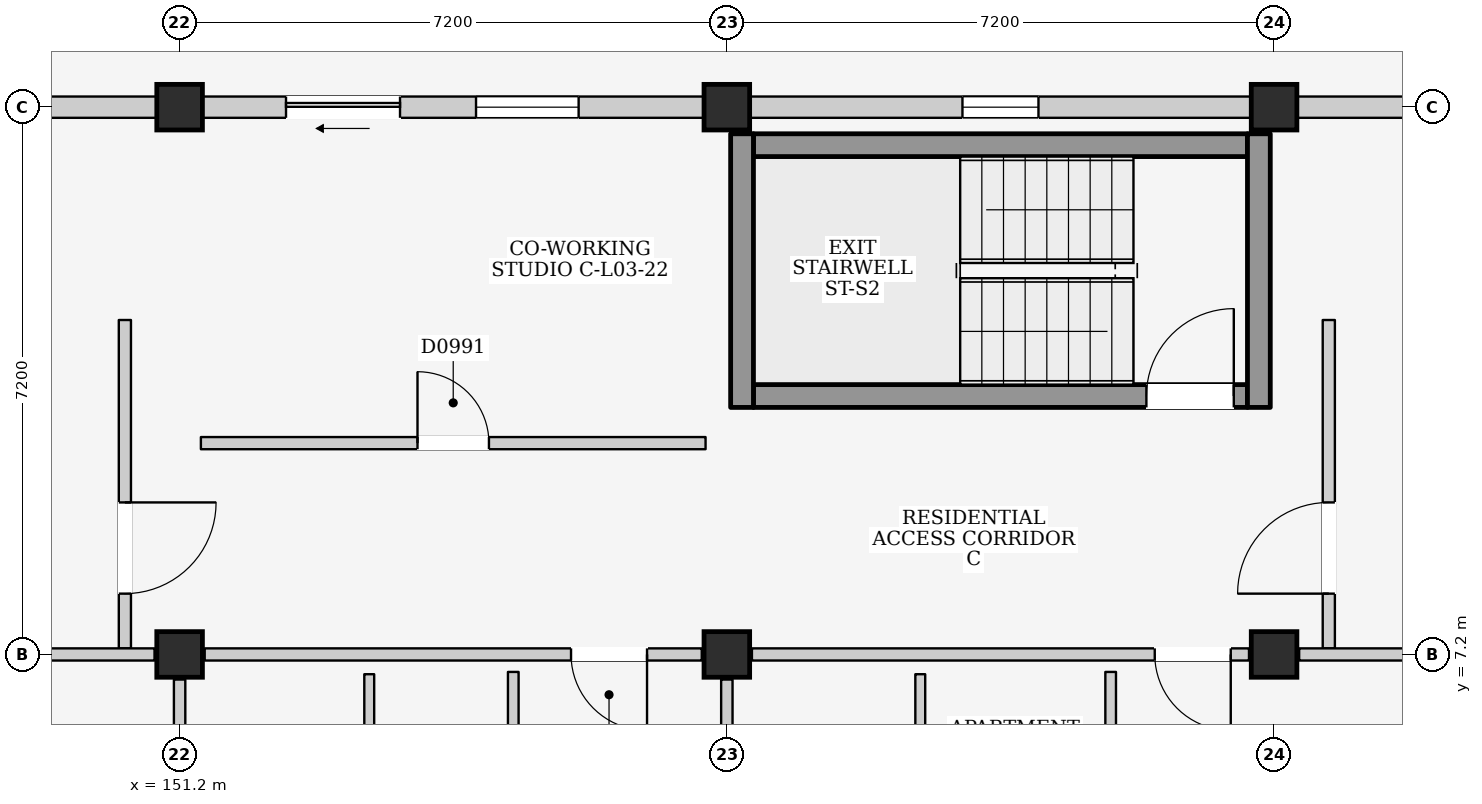
"""IFC4 building model, lengths in metres.
Left out: names, types, materials, properties, quantities, classifications, styles, units other than length and angle.
Written with IfcOpenShell. Run it as: python <this file> out.ifc"""

import sys

from ifc_helpers import new_model, si_unit, direction, frame, frame_2d, origin, origin_2d, place, context, subcontext, project, spatial, rectangle, extrude, element, fill, save


model = new_model("IFC4")
c1 = context("Model", 3, precision=1e-05, world=origin(), true_north=direction((0.0, 1.0)))
c2 = subcontext(c1, "Body", "Model", "MODEL_VIEW")
j1 = project(units=[si_unit("LENGTHUNIT", "METRE"), si_unit("PLANEANGLEUNIT", "RADIAN")], contexts=[c1])
p1 = place(None, origin())
s1 = spatial("IfcSite", under=j1, at=p1, CompositionType="ELEMENT")
p2 = place(p1, origin())
s2 = spatial("IfcBuilding", under=s1, at=p2, CompositionType="ELEMENT")
p3 = place(p2, frame((0.0, 0.0, 12.2)))
s3 = spatial("IfcBuildingStorey", under=s2, at=p3, CompositionType="ELEMENT", Elevation=12.2)
for number, where, z_axis, x_axis in (
    (1, (151.2, 7.2, 0.0), (0.0, 0.0, 1.0), (1.0, 0.0, 0.0)),
    (2, (151.2, 14.4, 0.0), (0.0, 0.0, 1.0), (1.0, 0.0, 0.0)),
    (3, (158.4, 7.2, 0.0), (0.0, 0.0, 1.0), (1.0, 0.0, 0.0)),
    (4, (158.4, 14.4, 0.0), (0.0, 0.0, 1.0), (1.0, 0.0, 0.0)),
    (5, (165.6, 7.2, 0.0), (0.0, 0.0, 1.0), (1.0, 0.0, 0.0)),
    (6, (165.6, 14.4, 0.0), (0.0, 0.0, 1.0), (1.0, 0.0, 0.0)),
):
    element("IfcColumn", number, at=place(p3, frame(where, z_axis=z_axis, x_axis=x_axis)), inside=s3, PredefinedType="COLUMN", context=c2, shape_type="SweptSolid", body=[
        extrude(rectangle(XDim=0.6, YDim=0.6, at=origin_2d()), origin(), (0.0, 0.0, 1.0), 3.2),
    ])
p4 = place(p3, frame((144.3, 14.4, 0.0), z_axis=(0.0, 0.0, 1.0), x_axis=(1.0, 0.0, 0.0)))
e7 = element("IfcWall", 7, at=p4, inside=s3, PredefinedType="ELEMENTEDWALL", context=c2, shape_type="SweptSolid", body=[
    extrude(rectangle(XDim=6.6, YDim=0.28, at=frame_2d((3.3, 0.0))), origin(), (0.0, 0.0, 1.0), 2.365),
])
p5 = place(p4, frame((2.8, 0.0, 1.2)))
e8 = element("IfcOpeningElement", 8, at=p5, cuts=e7, PredefinedType="OPENING", context=c2, shape_type="SweptSolid", body=[
    extrude(rectangle(XDim=1.0, YDim=0.9, at=frame_2d((0.5, 0.45))), frame((0.0, 0.155, 0.0), z_axis=(0.0, -1.0, 0.0), x_axis=(1.0, 0.0, 0.0)), (0.0, 0.0, 1.0), 0.31),
])
p6 = place(p3, frame((151.5, 14.4, 0.0), z_axis=(0.0, 0.0, 1.0), x_axis=(1.0, 0.0, 0.0)))
e9 = element("IfcWall", 9, at=p6, inside=s3, PredefinedType="ELEMENTEDWALL", context=c2, shape_type="SweptSolid", body=[
    extrude(rectangle(XDim=6.6, YDim=0.28, at=frame_2d((3.3, 0.0))), origin(), (0.0, 0.0, 1.0), 2.365),
])
p7 = place(p6, frame((1.1, 0.0, 0.0)))
e10 = element("IfcOpeningElement", 10, at=p7, cuts=e9, PredefinedType="OPENING", context=c2, shape_type="SweptSolid", body=[
    extrude(rectangle(XDim=1.5, YDim=2.12, at=frame_2d((0.75, 1.06))), frame((0.0, 0.155, 0.0), z_axis=(0.0, -1.0, 0.0), x_axis=(1.0, 0.0, 0.0)), (0.0, 0.0, 1.0), 0.31),
])
p8 = place(p6, frame((3.6, 0.0, 0.755)))
e11 = element("IfcOpeningElement", 11, at=p8, cuts=e9, PredefinedType="OPENING", context=c2, shape_type="SweptSolid", body=[
    extrude(rectangle(XDim=1.35, YDim=1.5, at=frame_2d((0.675, 0.75))), frame((0.0, 0.155, 0.0), z_axis=(0.0, -1.0, 0.0), x_axis=(1.0, 0.0, 0.0)), (0.0, 0.0, 1.0), 0.31),
])
p9 = place(p3, frame((158.7, 14.4, 0.0), z_axis=(0.0, 0.0, 1.0), x_axis=(1.0, 0.0, 0.0)))
e12 = element("IfcWall", 12, at=p9, inside=s3, PredefinedType="ELEMENTEDWALL", context=c2, shape_type="SweptSolid", body=[
    extrude(rectangle(XDim=6.6, YDim=0.28, at=frame_2d((3.3, 0.0))), origin(), (0.0, 0.0, 1.0), 2.365),
])
p10 = place(p9, frame((2.8, 0.0, 1.2)))
e13 = element("IfcOpeningElement", 13, at=p10, cuts=e12, PredefinedType="OPENING", context=c2, shape_type="SweptSolid", body=[
    extrude(rectangle(XDim=1.0, YDim=0.9, at=frame_2d((0.5, 0.45))), frame((0.0, 0.155, 0.0), z_axis=(0.0, -1.0, 0.0), x_axis=(1.0, 0.0, 0.0)), (0.0, 0.0, 1.0), 0.31),
])
p11 = place(p3, frame((165.9, 14.4, 0.0), z_axis=(0.0, 0.0, 1.0), x_axis=(1.0, 0.0, 0.0)))
e14 = element("IfcWall", 14, at=p11, inside=s3, PredefinedType="ELEMENTEDWALL", context=c2, shape_type="SweptSolid", body=[
    extrude(rectangle(XDim=6.6, YDim=0.28, at=frame_2d((3.3, 0.0))), origin(), (0.0, 0.0, 1.0), 2.365),
])
p12 = place(p11, frame((2.8, 0.0, 1.2)))
e15 = element("IfcOpeningElement", 15, at=p12, cuts=e14, PredefinedType="OPENING", context=c2, shape_type="SweptSolid", body=[
    extrude(rectangle(XDim=1.0, YDim=0.9, at=frame_2d((0.5, 0.45))), frame((0.0, 0.155, 0.0), z_axis=(0.0, -1.0, 0.0), x_axis=(1.0, 0.0, 0.0)), (0.0, 0.0, 1.0), 0.31),
])
p13 = place(p3, frame((150.48, 7.28, 0.0), z_axis=(0.0, 0.0, 1.0), x_axis=(0.0, 1.0, 0.0)))
e16 = element("IfcWall", 16, at=p13, inside=s3, PredefinedType="PARTITIONING", context=c2, shape_type="SweptSolid", body=[
    extrude(rectangle(XDim=4.32, YDim=0.16, at=frame_2d((2.16, 0.0))), origin(), (0.0, 0.0, 1.0), 2.98),
])
p14 = place(p13, frame((0.72, 0.0, 0.0)))
e17 = element("IfcOpeningElement", 17, at=p14, cuts=e16, PredefinedType="OPENING", context=c2, shape_type="SweptSolid", body=[
    extrude(rectangle(XDim=1.2, YDim=2.2, at=frame_2d((0.6, 1.1))), frame((0.0, 0.095, 0.0), z_axis=(0.0, -1.0, 0.0), x_axis=(1.0, 0.0, 0.0)), (0.0, 0.0, 1.0), 0.19),
])
p15 = place(p3, frame((158.75, 10.6, 0.0), z_axis=(0.0, 0.0, 1.0), x_axis=(1.0, 0.0, 0.0)))
e18 = element("IfcWall", 18, at=p15, inside=s3, PredefinedType="SHEAR", context=c2, shape_type="SweptSolid", body=[
    extrude(rectangle(XDim=6.5, YDim=0.3, at=frame_2d((3.25, 0.0))), origin(), (0.0, 0.0, 1.0), 2.98),
])
p16 = place(p15, frame((5.17, 0.0, 0.0)))
e19 = element("IfcOpeningElement", 19, at=p16, cuts=e18, PredefinedType="OPENING", context=c2, shape_type="SweptSolid", body=[
    extrude(rectangle(XDim=1.15, YDim=2.2, at=frame_2d((0.575, 1.1))), frame((0.0, 0.165, 0.0), z_axis=(0.0, -1.0, 0.0), x_axis=(1.0, 0.0, 0.0)), (0.0, 0.0, 1.0), 0.33),
])
p17 = place(p3, frame((158.75, 13.9, 0.0), z_axis=(0.0, 0.0, 1.0), x_axis=(1.0, 0.0, 0.0)))
e20 = element("IfcWall", 20, at=p17, inside=s3, PredefinedType="SHEAR", context=c2, shape_type="SweptSolid", body=[
    extrude(rectangle(XDim=6.5, YDim=0.3, at=frame_2d((3.25, 0.0))), origin(), (0.0, 0.0, 1.0), 2.98),
])
for number, where, z_axis, x_axis in (
    (21, (158.6, 10.45, 0.0), (0.0, 0.0, 1.0), (0.0, 1.0, 0.0)),
    (22, (165.4, 10.45, 0.0), (0.0, 0.0, 1.0), (0.0, 1.0, 0.0)),
):
    element("IfcWall", number, at=place(p3, frame(where, z_axis=z_axis, x_axis=x_axis)), inside=s3, PredefinedType="SHEAR", context=c2, shape_type="SweptSolid", body=[
        extrude(rectangle(XDim=3.6, YDim=0.3, at=frame_2d((1.8, 0.0))), origin(), (0.0, 0.0, 1.0), 2.98),
    ])
p18 = place(p3, frame((166.32, 7.28, 0.0), z_axis=(0.0, 0.0, 1.0), x_axis=(0.0, 1.0, 0.0)))
e23 = element("IfcWall", 23, at=p18, inside=s3, PredefinedType="PARTITIONING", context=c2, shape_type="SweptSolid", body=[
    extrude(rectangle(XDim=4.32, YDim=0.16, at=frame_2d((2.16, 0.0))), origin(), (0.0, 0.0, 1.0), 2.98),
])
p19 = place(p18, frame((0.72, 0.0, 0.0)))
e24 = element("IfcOpeningElement", 24, at=p19, cuts=e23, PredefinedType="OPENING", context=c2, shape_type="SweptSolid", body=[
    extrude(rectangle(XDim=1.2, YDim=2.2, at=frame_2d((0.6, 1.1))), frame((0.0, 0.095, 0.0), z_axis=(0.0, -1.0, 0.0), x_axis=(1.0, 0.0, 0.0)), (0.0, 0.0, 1.0), 0.19),
])
p20 = place(p3, frame((144.33, 7.2, 0.0), z_axis=(0.0, 0.0, 1.0), x_axis=(1.0, 0.0, 0.0)))
e25 = element("IfcWall", 25, at=p20, inside=s3, PredefinedType="PARTITIONING", context=c2, shape_type="SweptSolid", body=[
    extrude(rectangle(XDim=6.54, YDim=0.16, at=frame_2d((3.27, 0.0))), origin(), (0.0, 0.0, 1.0), 2.365),
])
p21 = place(p3, frame((151.2, 0.33, 0.0), z_axis=(0.0, 0.0, 1.0), x_axis=(0.0, 1.0, 0.0)))
e26 = element("IfcWall", 26, at=p21, inside=s3, PredefinedType="PARTITIONING", context=c2, shape_type="SweptSolid", body=[
    extrude(rectangle(XDim=6.54, YDim=0.15, at=frame_2d((3.27, 0.0))), origin(), (0.0, 0.0, 1.0), 2.415),
])
p22 = place(p3, frame((151.53, 7.2, 0.0), z_axis=(0.0, 0.0, 1.0), x_axis=(1.0, 0.0, 0.0)))
e27 = element("IfcWall", 27, at=p22, inside=s3, PredefinedType="PARTITIONING", context=c2, shape_type="SweptSolid", body=[
    extrude(rectangle(XDim=6.54, YDim=0.16, at=frame_2d((3.27, 0.0))), origin(), (0.0, 0.0, 1.0), 2.365),
])
p23 = place(p22, frame((4.82, 0.0, 0.0)))
e28 = element("IfcOpeningElement", 28, at=p23, cuts=e27, PredefinedType="OPENING", context=c2, shape_type="SweptSolid", body=[
    extrude(rectangle(XDim=1.0, YDim=2.15, at=frame_2d((0.5, 1.075))), frame((0.0, 0.095, 0.0), z_axis=(0.0, -1.0, 0.0), x_axis=(1.0, 0.0, 0.0)), (0.0, 0.0, 1.0), 0.19),
])
p24 = place(p3, frame((158.4, 0.33, 0.0), z_axis=(0.0, 0.0, 1.0), x_axis=(0.0, 1.0, 0.0)))
e29 = element("IfcWall", 29, at=p24, inside=s3, PredefinedType="PARTITIONING", context=c2, shape_type="SweptSolid", body=[
    extrude(rectangle(XDim=6.54, YDim=0.15, at=frame_2d((3.27, 0.0))), origin(), (0.0, 0.0, 1.0), 2.415),
])
p25 = place(p3, frame((153.695, 4.61, 0.0), z_axis=(0.0, 0.0, 1.0), x_axis=(0.0, 1.0, 0.0)))
e30 = element("IfcWall", 30, at=p25, inside=s3, PredefinedType="PARTITIONING", context=c2, shape_type="SweptSolid", body=[
    extrude(rectangle(XDim=2.33, YDim=0.13, at=frame_2d((1.165, 0.0))), origin(), (0.0, 0.0, 1.0), 2.98),
])
p26 = place(p3, frame((155.59, 4.62, 0.0), z_axis=(0.0, 0.0, 1.0), x_axis=(0.0, 1.0, 0.0)))
e31 = element("IfcWall", 31, at=p26, inside=s3, PredefinedType="PARTITIONING", context=c2, shape_type="SweptSolid", body=[
    extrude(rectangle(XDim=2.35, YDim=0.14, at=frame_2d((1.175, 0.0))), origin(), (0.0, 0.0, 1.0), 2.98),
])
p27 = place(p3, frame((158.73, 7.2, 0.0), z_axis=(0.0, 0.0, 1.0), x_axis=(1.0, 0.0, 0.0)))
e32 = element("IfcWall", 32, at=p27, inside=s3, PredefinedType="PARTITIONING", context=c2, shape_type="SweptSolid", body=[
    extrude(rectangle(XDim=6.54, YDim=0.16, at=frame_2d((3.27, 0.0))), origin(), (0.0, 0.0, 1.0), 2.365),
])
p28 = place(p27, frame((5.3, 0.0, 0.0)))
e33 = element("IfcOpeningElement", 33, at=p28, cuts=e32, PredefinedType="OPENING", context=c2, shape_type="SweptSolid", body=[
    extrude(rectangle(XDim=1.0, YDim=2.15, at=frame_2d((0.5, 1.075))), frame((0.0, 0.095, 0.0), z_axis=(0.0, -1.0, 0.0), x_axis=(1.0, 0.0, 0.0)), (0.0, 0.0, 1.0), 0.19),
])
p29 = place(p3, frame((165.93, 7.2, 0.0), z_axis=(0.0, 0.0, 1.0), x_axis=(1.0, 0.0, 0.0)))
e34 = element("IfcWall", 34, at=p29, inside=s3, PredefinedType="PARTITIONING", context=c2, shape_type="SweptSolid", body=[
    extrude(rectangle(XDim=6.54, YDim=0.16, at=frame_2d((3.27, 0.0))), origin(), (0.0, 0.0, 1.0), 2.365),
])
p30 = place(p3, frame((160.945, 3.9, 0.0), z_axis=(0.0, 0.0, 1.0), x_axis=(0.0, 1.0, 0.0)))
e35 = element("IfcWall", 35, at=p30, inside=s3, PredefinedType="PARTITIONING", context=c2, shape_type="SweptSolid", body=[
    extrude(rectangle(XDim=3.04, YDim=0.13, at=frame_2d((1.52, 0.0))), origin(), (0.0, 0.0, 1.0), 2.98),
])
p31 = place(p3, frame((163.45, 3.91, 0.0), z_axis=(0.0, 0.0, 1.0), x_axis=(0.0, 1.0, 0.0)))
e36 = element("IfcWall", 36, at=p31, inside=s3, PredefinedType="PARTITIONING", context=c2, shape_type="SweptSolid", body=[
    extrude(rectangle(XDim=3.06, YDim=0.14, at=frame_2d((1.53, 0.0))), origin(), (0.0, 0.0, 1.0), 2.98),
])
p32 = place(p3, frame((151.48, 9.98, 0.0), z_axis=(0.0, 0.0, 1.0), x_axis=(1.0, 0.0, 0.0)))
e37 = element("IfcWall", 37, at=p32, inside=s3, PredefinedType="PARTITIONING", context=c2, shape_type="SweptSolid", body=[
    extrude(rectangle(XDim=6.64, YDim=0.16, at=frame_2d((3.32, 0.0))), origin(), (0.0, 0.0, 1.0), 2.98),
])
p33 = place(p32, frame((2.85, 0.0, 0.0)))
e38 = element("IfcOpeningElement", 38, at=p33, cuts=e37, PredefinedType="OPENING", context=c2, shape_type="SweptSolid", body=[
    extrude(rectangle(XDim=0.94, YDim=2.12, at=frame_2d((0.47, 1.06))), frame((0.0, 0.095, 0.0), z_axis=(0.0, -1.0, 0.0), x_axis=(1.0, 0.0, 0.0)), (0.0, 0.0, 1.0), 0.19),
])
p34 = place(p7, frame((1.5, 0.0, 0.0), z_axis=(0.0, 0.0, 1.0), x_axis=(-1.0, 0.0, 0.0)))
e39 = element("IfcDoor", 39, at=p34, inside=s3, OperationType="SLIDING_TO_LEFT", PredefinedType="DOOR", context=c2, shape_type="SweptSolid", body=[
    extrude(rectangle(XDim=1.5, YDim=2.12, at=frame_2d((0.75, 1.06))), frame((0.0, 0.025, 0.0), z_axis=(0.0, -1.0, 0.0), x_axis=(1.0, 0.0, 0.0)), (0.0, 0.0, 1.0), 0.05),
])
fill(e10, e39)
p35 = place(p8, origin())
e40 = element("IfcWindow", 40, at=p35, inside=s3, PartitioningType="SINGLE_PANEL", PredefinedType="WINDOW", context=c2, shape_type="SweptSolid", body=[
    extrude(rectangle(XDim=1.35, YDim=1.5, at=frame_2d((0.675, 0.75))), frame((0.0, 0.03, 0.0), z_axis=(0.0, -1.0, 0.0), x_axis=(1.0, 0.0, 0.0)), (0.0, 0.0, 1.0), 0.06),
])
fill(e11, e40)
p36 = place(p10, origin())
e41 = element("IfcWindow", 41, at=p36, inside=s3, PartitioningType="SINGLE_PANEL", PredefinedType="WINDOW", context=c2, shape_type="SweptSolid", body=[
    extrude(rectangle(XDim=1.0, YDim=0.9, at=frame_2d((0.5, 0.45))), frame((0.0, 0.03, 0.0), z_axis=(0.0, -1.0, 0.0), x_axis=(1.0, 0.0, 0.0)), (0.0, 0.0, 1.0), 0.06),
])
fill(e13, e41)
p37 = place(p14, frame((1.2, 0.0, 0.0), z_axis=(0.0, 0.0, 1.0), x_axis=(-1.0, 0.0, 0.0)))
e42 = element("IfcDoor", 42, at=p37, inside=s3, OperationType="SINGLE_SWING_LEFT", PredefinedType="DOOR", context=c2, shape_type="SweptSolid", body=[
    extrude(rectangle(XDim=1.2, YDim=2.2, at=frame_2d((0.6, 1.1))), frame((0.0, 0.025, 0.0), z_axis=(0.0, -1.0, 0.0), x_axis=(1.0, 0.0, 0.0)), (0.0, 0.0, 1.0), 0.05),
])
fill(e17, e42)
p38 = place(p16, origin())
e43 = element("IfcDoor", 43, at=p38, inside=s3, OperationType="SINGLE_SWING_RIGHT", PredefinedType="DOOR", context=c2, shape_type="SweptSolid", body=[
    extrude(rectangle(XDim=1.15, YDim=2.2, at=frame_2d((0.575, 1.1))), frame((0.0, 0.025, 0.0), z_axis=(0.0, -1.0, 0.0), x_axis=(1.0, 0.0, 0.0)), (0.0, 0.0, 1.0), 0.05),
])
fill(e19, e43)
p39 = place(p19, origin())
e44 = element("IfcDoor", 44, at=p39, inside=s3, OperationType="SINGLE_SWING_LEFT", PredefinedType="DOOR", context=c2, shape_type="SweptSolid", body=[
    extrude(rectangle(XDim=1.2, YDim=2.2, at=frame_2d((0.6, 1.1))), frame((0.0, 0.025, 0.0), z_axis=(0.0, -1.0, 0.0), x_axis=(1.0, 0.0, 0.0)), (0.0, 0.0, 1.0), 0.05),
])
fill(e24, e44)
p40 = place(p23, frame((1.0, 0.0, 0.0), z_axis=(0.0, 0.0, 1.0), x_axis=(-1.0, 0.0, 0.0)))
e45 = element("IfcDoor", 45, at=p40, inside=s3, OperationType="SINGLE_SWING_LEFT", PredefinedType="DOOR", context=c2, shape_type="SweptSolid", body=[
    extrude(rectangle(XDim=1.0, YDim=2.15, at=frame_2d((0.5, 1.075))), frame((0.0, 0.025, 0.0), z_axis=(0.0, -1.0, 0.0), x_axis=(1.0, 0.0, 0.0)), (0.0, 0.0, 1.0), 0.05),
])
fill(e28, e45)
p41 = place(p28, frame((1.0, 0.0, 0.0), z_axis=(0.0, 0.0, 1.0), x_axis=(-1.0, 0.0, 0.0)))
e46 = element("IfcDoor", 46, at=p41, inside=s3, OperationType="SINGLE_SWING_LEFT", PredefinedType="DOOR", context=c2, shape_type="SweptSolid", body=[
    extrude(rectangle(XDim=1.0, YDim=2.15, at=frame_2d((0.5, 1.075))), frame((0.0, 0.025, 0.0), z_axis=(0.0, -1.0, 0.0), x_axis=(1.0, 0.0, 0.0)), (0.0, 0.0, 1.0), 0.05),
])
fill(e33, e46)
p42 = place(p33, origin())
e47 = element("IfcDoor", 47, at=p42, inside=s3, OperationType="SINGLE_SWING_LEFT", PredefinedType="DOOR", context=c2, shape_type="SweptSolid", body=[
    extrude(rectangle(XDim=0.94, YDim=2.12, at=frame_2d((0.47, 1.06))), frame((0.0, 0.025, 0.0), z_axis=(0.0, -1.0, 0.0), x_axis=(1.0, 0.0, 0.0)), (0.0, 0.0, 1.0), 0.05),
])
fill(e38, e47)
save(model, sys.argv[1])
